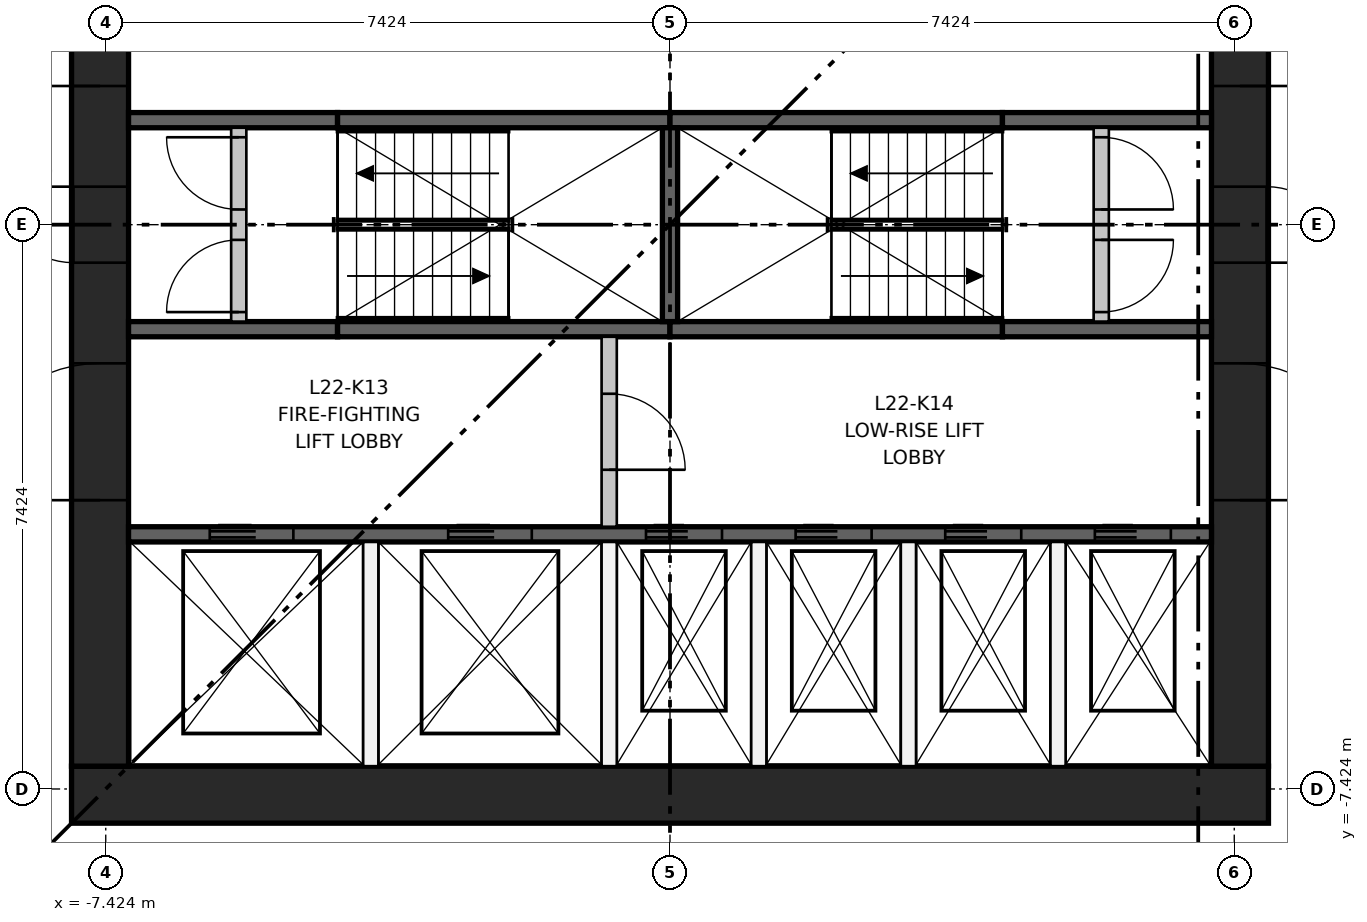
"""IFC4 building model, lengths in metres.
Left out: names, types, materials, properties, quantities, classifications, styles, units other than length and angle.
Written with IfcOpenShell. Run it as: python <this file> out.ifc"""

import sys

from ifc_helpers import new_model, si_unit, direction, frame, frame_2d, origin, place, context, subcontext, project, spatial, rectangle, extrude, element, fill, save


model = new_model("IFC4")
c1 = context("Model", 3, precision=1e-05, world=origin(), true_north=direction((0.0, 1.0)))
c2 = subcontext(c1, "Body", "Model", "MODEL_VIEW")
j1 = project(units=[si_unit("LENGTHUNIT", "METRE"), si_unit("PLANEANGLEUNIT", "RADIAN")], contexts=[c1])
p1 = place(None, origin())
s1 = spatial("IfcSite", under=j1, at=p1, CompositionType="ELEMENT")
p2 = place(p1, origin())
s2 = spatial("IfcBuilding", under=s1, at=p2, CompositionType="ELEMENT")
p3 = place(p2, frame((0.0, 0.0, 87.35)))
s3 = spatial("IfcBuildingStorey", under=s2, at=p3, CompositionType="ELEMENT", Elevation=87.35)
p4 = place(p3, frame((-7.874, -7.499, 0.0), z_axis=(0.0, 0.0, 1.0), x_axis=(1.0, 0.0, 0.0)))
e1 = element("IfcWall", 1, at=p4, inside=s3, PredefinedType="SHEAR", context=c2, shape_type="SweptSolid", body=[
    extrude(rectangle(XDim=15.748, YDim=0.75, at=frame_2d((7.874, 0.0))), origin(), (0.0, 0.0, 1.0), 3.65),
])
p5 = place(p3, frame((-7.499, -7.124, 0.0), z_axis=(0.0, 0.0, 1.0), x_axis=(0.0, 1.0, 0.0)))
e2 = element("IfcWall", 2, at=p5, inside=s3, PredefinedType="SHEAR", context=c2, shape_type="SweptSolid", body=[
    extrude(rectangle(XDim=14.248, YDim=0.75, at=frame_2d((7.124, 0.0))), origin(), (0.0, 0.0, 1.0), 3.65),
])
p6 = place(p5, frame((6.624, 0.0, 0.0)))
e3 = element("IfcOpeningElement", 3, at=p6, cuts=e2, PredefinedType="OPENING", context=c2, shape_type="SweptSolid", body=[
    extrude(rectangle(XDim=1.0, YDim=2.1, at=frame_2d((0.5, 1.05))), frame((0.0, 0.385, 0.0), z_axis=(0.0, -1.0, 0.0), x_axis=(1.0, 0.0, 0.0)), (0.0, 0.0, 1.0), 0.77),
])
p7 = place(p5, frame((3.5, 0.0, 0.0)))
e4 = element("IfcOpeningElement", 4, at=p7, cuts=e2, PredefinedType="OPENING", context=c2, shape_type="SweptSolid", body=[
    extrude(rectangle(XDim=1.8, YDim=2.1, at=frame_2d((0.9, 1.05))), frame((0.0, 0.385, 0.0), z_axis=(0.0, -1.0, 0.0), x_axis=(1.0, 0.0, 0.0)), (0.0, 0.0, 1.0), 0.77),
])
p8 = place(p5, frame((8.948, 0.0, 0.0)))
e5 = element("IfcOpeningElement", 5, at=p8, cuts=e2, PredefinedType="OPENING", context=c2, shape_type="SweptSolid", body=[
    extrude(rectangle(XDim=1.8, YDim=2.1, at=frame_2d((0.9, 1.05))), frame((0.0, 0.385, 0.0), z_axis=(0.0, -1.0, 0.0), x_axis=(1.0, 0.0, 0.0)), (0.0, 0.0, 1.0), 0.77),
])
p9 = place(p5, frame((12.124, 0.0, 0.0)))
e6 = element("IfcOpeningElement", 6, at=p9, cuts=e2, PredefinedType="OPENING", context=c2, shape_type="SweptSolid", body=[
    extrude(rectangle(XDim=1.0, YDim=2.1, at=frame_2d((0.5, 1.05))), frame((0.0, 0.385, 0.0), z_axis=(0.0, -1.0, 0.0), x_axis=(1.0, 0.0, 0.0)), (0.0, 0.0, 1.0), 0.77),
])
p10 = place(p3, frame((7.499, -7.124, 0.0), z_axis=(0.0, 0.0, 1.0), x_axis=(0.0, 1.0, 0.0)))
e7 = element("IfcWall", 7, at=p10, inside=s3, PredefinedType="SHEAR", context=c2, shape_type="SweptSolid", body=[
    extrude(rectangle(XDim=14.248, YDim=0.75, at=frame_2d((7.124, 0.0))), origin(), (0.0, 0.0, 1.0), 3.65),
])
p11 = place(p10, frame((6.624, 0.0, 0.0)))
e8 = element("IfcOpeningElement", 8, at=p11, cuts=e7, PredefinedType="OPENING", context=c2, shape_type="SweptSolid", body=[
    extrude(rectangle(XDim=1.0, YDim=2.1, at=frame_2d((0.5, 1.05))), frame((0.0, 0.385, 0.0), z_axis=(0.0, -1.0, 0.0), x_axis=(1.0, 0.0, 0.0)), (0.0, 0.0, 1.0), 0.77),
])
p12 = place(p10, frame((3.5, 0.0, 0.0)))
e9 = element("IfcOpeningElement", 9, at=p12, cuts=e7, PredefinedType="OPENING", context=c2, shape_type="SweptSolid", body=[
    extrude(rectangle(XDim=1.8, YDim=2.1, at=frame_2d((0.9, 1.05))), frame((0.0, 0.385, 0.0), z_axis=(0.0, -1.0, 0.0), x_axis=(1.0, 0.0, 0.0)), (0.0, 0.0, 1.0), 0.77),
])
p13 = place(p10, frame((8.948, 0.0, 0.0)))
e10 = element("IfcOpeningElement", 10, at=p13, cuts=e7, PredefinedType="OPENING", context=c2, shape_type="SweptSolid", body=[
    extrude(rectangle(XDim=1.8, YDim=2.1, at=frame_2d((0.9, 1.05))), frame((0.0, 0.385, 0.0), z_axis=(0.0, -1.0, 0.0), x_axis=(1.0, 0.0, 0.0)), (0.0, 0.0, 1.0), 0.77),
])
p14 = place(p3, frame((-7.124, -4.074, 0.0), z_axis=(0.0, 0.0, 1.0), x_axis=(1.0, 0.0, 0.0)))
e11 = element("IfcWall", 11, at=p14, inside=s3, PredefinedType="SHEAR", context=c2, shape_type="SweptSolid", body=[
    extrude(rectangle(XDim=14.248, YDim=0.2, at=frame_2d((7.124, 0.0))), origin(), (0.0, 0.0, 1.0), 3.3),
])
p15 = place(p14, frame((1.069, 0.0, 0.0)))
e12 = element("IfcOpeningElement", 12, at=p15, cuts=e11, PredefinedType="OPENING", context=c2, shape_type="SweptSolid", body=[
    extrude(rectangle(XDim=1.1, YDim=2.1, at=frame_2d((0.55, 1.05))), frame((0.0, 0.11, 0.0), z_axis=(0.0, -1.0, 0.0), x_axis=(1.0, 0.0, 0.0)), (0.0, 0.0, 1.0), 0.22),
])
p16 = place(p14, frame((4.206, 0.0, 0.0)))
e13 = element("IfcOpeningElement", 13, at=p16, cuts=e11, PredefinedType="OPENING", context=c2, shape_type="SweptSolid", body=[
    extrude(rectangle(XDim=1.1, YDim=2.1, at=frame_2d((0.55, 1.05))), frame((0.0, 0.11, 0.0), z_axis=(0.0, -1.0, 0.0), x_axis=(1.0, 0.0, 0.0)), (0.0, 0.0, 1.0), 0.22),
])
p17 = place(p14, frame((6.808, 0.0, 0.0)))
e14 = element("IfcOpeningElement", 14, at=p17, cuts=e11, PredefinedType="OPENING", context=c2, shape_type="SweptSolid", body=[
    extrude(rectangle(XDim=1.0, YDim=2.1, at=frame_2d((0.5, 1.05))), frame((0.0, 0.11, 0.0), z_axis=(0.0, -1.0, 0.0), x_axis=(1.0, 0.0, 0.0)), (0.0, 0.0, 1.0), 0.22),
])
p18 = place(p14, frame((8.777, 0.0, 0.0)))
e15 = element("IfcOpeningElement", 15, at=p18, cuts=e11, PredefinedType="OPENING", context=c2, shape_type="SweptSolid", body=[
    extrude(rectangle(XDim=1.0, YDim=2.1, at=frame_2d((0.5, 1.05))), frame((0.0, 0.11, 0.0), z_axis=(0.0, -1.0, 0.0), x_axis=(1.0, 0.0, 0.0)), (0.0, 0.0, 1.0), 0.22),
])
p19 = place(p14, frame((10.745, 0.0, 0.0)))
e16 = element("IfcOpeningElement", 16, at=p19, cuts=e11, PredefinedType="OPENING", context=c2, shape_type="SweptSolid", body=[
    extrude(rectangle(XDim=1.0, YDim=2.1, at=frame_2d((0.5, 1.05))), frame((0.0, 0.11, 0.0), z_axis=(0.0, -1.0, 0.0), x_axis=(1.0, 0.0, 0.0)), (0.0, 0.0, 1.0), 0.22),
])
p20 = place(p14, frame((12.714, 0.0, 0.0)))
e17 = element("IfcOpeningElement", 17, at=p20, cuts=e11, PredefinedType="OPENING", context=c2, shape_type="SweptSolid", body=[
    extrude(rectangle(XDim=1.0, YDim=2.1, at=frame_2d((0.5, 1.05))), frame((0.0, 0.11, 0.0), z_axis=(0.0, -1.0, 0.0), x_axis=(1.0, 0.0, 0.0)), (0.0, 0.0, 1.0), 0.22),
])
p21 = place(p3, frame((-7.124, -1.375, 0.0), z_axis=(0.0, 0.0, 1.0), x_axis=(1.0, 0.0, 0.0)))
e18 = element("IfcWall", 18, at=p21, inside=s3, PredefinedType="SHEAR", context=c2, shape_type="SweptSolid", body=[
    extrude(rectangle(XDim=2.75, YDim=0.2, at=frame_2d((1.375, 0.0))), origin(), (0.0, 0.0, 1.0), 3.3),
])
for number, where, z_axis, x_axis in (
    (19, (-4.374, -1.375, 0.0), (0.0, 0.0, 1.0), (1.0, 0.0, 0.0)),
    (20, (0.0, -1.375, 0.0), (0.0, 0.0, 1.0), (1.0, 0.0, 0.0)),
):
    element("IfcWall", number, at=place(p3, frame(where, z_axis=z_axis, x_axis=x_axis)), inside=s3, PredefinedType="SHEAR", context=c2, shape_type="SweptSolid", body=[
        extrude(rectangle(XDim=4.374, YDim=0.2, at=frame_2d((2.187, 0.0))), origin(), (0.0, 0.0, 1.0), 3.3),
    ])
for number, where, z_axis, x_axis in (
    (21, (4.374, -1.375, 0.0), (0.0, 0.0, 1.0), (1.0, 0.0, 0.0)),
    (22, (-7.124, 1.375, 0.0), (0.0, 0.0, 1.0), (1.0, 0.0, 0.0)),
):
    element("IfcWall", number, at=place(p3, frame(where, z_axis=z_axis, x_axis=x_axis)), inside=s3, PredefinedType="SHEAR", context=c2, shape_type="SweptSolid", body=[
        extrude(rectangle(XDim=2.75, YDim=0.2, at=frame_2d((1.375, 0.0))), origin(), (0.0, 0.0, 1.0), 3.3),
    ])
for number, where, z_axis, x_axis in (
    (23, (-4.374, 1.375, 0.0), (0.0, 0.0, 1.0), (1.0, 0.0, 0.0)),
    (24, (0.0, 1.375, 0.0), (0.0, 0.0, 1.0), (1.0, 0.0, 0.0)),
):
    element("IfcWall", number, at=place(p3, frame(where, z_axis=z_axis, x_axis=x_axis)), inside=s3, PredefinedType="SHEAR", context=c2, shape_type="SweptSolid", body=[
        extrude(rectangle(XDim=4.374, YDim=0.2, at=frame_2d((2.187, 0.0))), origin(), (0.0, 0.0, 1.0), 3.3),
    ])
p22 = place(p3, frame((4.374, 1.375, 0.0), z_axis=(0.0, 0.0, 1.0), x_axis=(1.0, 0.0, 0.0)))
e25 = element("IfcWall", 25, at=p22, inside=s3, PredefinedType="SHEAR", context=c2, shape_type="SweptSolid", body=[
    extrude(rectangle(XDim=2.75, YDim=0.2, at=frame_2d((1.375, 0.0))), origin(), (0.0, 0.0, 1.0), 3.3),
])
p23 = place(p3, frame((0.0, -1.275, 0.0), z_axis=(0.0, 0.0, 1.0), x_axis=(0.0, 1.0, 0.0)))
e26 = element("IfcWall", 26, at=p23, inside=s3, PredefinedType="SHEAR", context=c2, shape_type="SweptSolid", body=[
    extrude(rectangle(XDim=2.55, YDim=0.2, at=frame_2d((1.275, 0.0))), origin(), (0.0, 0.0, 1.0), 3.3),
])
for number, where, z_axis, x_axis in (
    (27, (-3.937, -7.124, 0.0), (0.0, 0.0, 1.0), (0.0, 1.0, 0.0)),
    (28, (-0.8, -7.124, 0.0), (0.0, 0.0, 1.0), (0.0, 1.0, 0.0)),
):
    element("IfcWall", number, at=place(p3, frame(where, z_axis=z_axis, x_axis=x_axis)), inside=s3, PredefinedType="PARTITIONING", context=c2, shape_type="SweptSolid", body=[
        extrude(rectangle(XDim=2.95, YDim=0.2, at=frame_2d((1.475, 0.0))), origin(), (0.0, 0.0, 1.0), 3.3),
    ])
p24 = place(p3, frame((-0.8, -3.974, 0.0), z_axis=(0.0, 0.0, 1.0), x_axis=(0.0, 1.0, 0.0)))
e29 = element("IfcWall", 29, at=p24, inside=s3, PredefinedType="PARTITIONING", context=c2, shape_type="SweptSolid", body=[
    extrude(rectangle(XDim=2.499, YDim=0.2, at=frame_2d((1.25, 0.0))), origin(), (0.0, 0.0, 1.0), 3.3),
])
p25 = place(p24, frame((0.75, 0.0, 0.0)))
e30 = element("IfcOpeningElement", 30, at=p25, cuts=e29, PredefinedType="OPENING", context=c2, shape_type="SweptSolid", body=[
    extrude(rectangle(XDim=1.0, YDim=2.1, at=frame_2d((0.5, 1.05))), frame((0.0, 0.11, 0.0), z_axis=(0.0, -1.0, 0.0), x_axis=(1.0, 0.0, 0.0)), (0.0, 0.0, 1.0), 0.22),
])
for number, where, z_axis, x_axis in (
    (31, (1.168, -7.124, 0.0), (0.0, 0.0, 1.0), (0.0, 1.0, 0.0)),
    (32, (3.137, -7.124, 0.0), (0.0, 0.0, 1.0), (0.0, 1.0, 0.0)),
    (33, (5.105, -7.124, 0.0), (0.0, 0.0, 1.0), (0.0, 1.0, 0.0)),
):
    element("IfcWall", number, at=place(p3, frame(where, z_axis=z_axis, x_axis=x_axis)), inside=s3, PredefinedType="PARTITIONING", context=c2, shape_type="SweptSolid", body=[
        extrude(rectangle(XDim=2.95, YDim=0.2, at=frame_2d((1.475, 0.0))), origin(), (0.0, 0.0, 1.0), 3.3),
    ])
p26 = place(p3, frame((-5.674, -1.275, 0.0), z_axis=(0.0, 0.0, 1.0), x_axis=(0.0, 1.0, 0.0)))
e34 = element("IfcWall", 34, at=p26, inside=s3, PredefinedType="PARTITIONING", context=c2, shape_type="SweptSolid", body=[
    extrude(rectangle(XDim=2.55, YDim=0.2, at=frame_2d((1.275, 0.0))), origin(), (0.0, 0.0, 1.0), 3.3),
])
p27 = place(p26, frame((0.125, 0.0, 0.0)))
e35 = element("IfcOpeningElement", 35, at=p27, cuts=e34, PredefinedType="OPENING", context=c2, shape_type="SweptSolid", body=[
    extrude(rectangle(XDim=0.95, YDim=2.1, at=frame_2d((0.475, 1.05))), frame((0.0, 0.11, 0.0), z_axis=(0.0, -1.0, 0.0), x_axis=(1.0, 0.0, 0.0)), (0.0, 0.0, 1.0), 0.22),
])
p28 = place(p26, frame((1.475, 0.0, 0.0)))
e36 = element("IfcOpeningElement", 36, at=p28, cuts=e34, PredefinedType="OPENING", context=c2, shape_type="SweptSolid", body=[
    extrude(rectangle(XDim=0.95, YDim=2.1, at=frame_2d((0.475, 1.05))), frame((0.0, 0.11, 0.0), z_axis=(0.0, -1.0, 0.0), x_axis=(1.0, 0.0, 0.0)), (0.0, 0.0, 1.0), 0.22),
])
p29 = place(p3, frame((5.674, -1.275, 0.0), z_axis=(0.0, 0.0, 1.0), x_axis=(0.0, 1.0, 0.0)))
e37 = element("IfcWall", 37, at=p29, inside=s3, PredefinedType="PARTITIONING", context=c2, shape_type="SweptSolid", body=[
    extrude(rectangle(XDim=2.55, YDim=0.2, at=frame_2d((1.275, 0.0))), origin(), (0.0, 0.0, 1.0), 3.3),
])
p30 = place(p29, frame((0.125, 0.0, 0.0)))
e38 = element("IfcOpeningElement", 38, at=p30, cuts=e37, PredefinedType="OPENING", context=c2, shape_type="SweptSolid", body=[
    extrude(rectangle(XDim=0.95, YDim=2.1, at=frame_2d((0.475, 1.05))), frame((0.0, 0.11, 0.0), z_axis=(0.0, -1.0, 0.0), x_axis=(1.0, 0.0, 0.0)), (0.0, 0.0, 1.0), 0.22),
])
p31 = place(p29, frame((1.475, 0.0, 0.0)))
e39 = element("IfcOpeningElement", 39, at=p31, cuts=e37, PredefinedType="OPENING", context=c2, shape_type="SweptSolid", body=[
    extrude(rectangle(XDim=0.95, YDim=2.1, at=frame_2d((0.475, 1.05))), frame((0.0, 0.11, 0.0), z_axis=(0.0, -1.0, 0.0), x_axis=(1.0, 0.0, 0.0)), (0.0, 0.0, 1.0), 0.22),
])
p32 = place(p15, origin())
e40 = element("IfcDoor", 40, at=p32, inside=s3, OperationType="DOUBLE_DOOR_SLIDING", PredefinedType="DOOR", context=c2, shape_type="SweptSolid", body=[
    extrude(rectangle(XDim=1.1, YDim=2.1, at=frame_2d((0.55, 1.05))), frame((0.0, 0.025, 0.0), z_axis=(0.0, -1.0, 0.0), x_axis=(1.0, 0.0, 0.0)), (0.0, 0.0, 1.0), 0.05),
])
fill(e12, e40)
p33 = place(p16, origin())
e41 = element("IfcDoor", 41, at=p33, inside=s3, OperationType="DOUBLE_DOOR_SLIDING", PredefinedType="DOOR", context=c2, shape_type="SweptSolid", body=[
    extrude(rectangle(XDim=1.1, YDim=2.1, at=frame_2d((0.55, 1.05))), frame((0.0, 0.025, 0.0), z_axis=(0.0, -1.0, 0.0), x_axis=(1.0, 0.0, 0.0)), (0.0, 0.0, 1.0), 0.05),
])
fill(e13, e41)
p34 = place(p17, origin())
e42 = element("IfcDoor", 42, at=p34, inside=s3, OperationType="DOUBLE_DOOR_SLIDING", PredefinedType="DOOR", context=c2, shape_type="SweptSolid", body=[
    extrude(rectangle(XDim=1.0, YDim=2.1, at=frame_2d((0.5, 1.05))), frame((0.0, 0.025, 0.0), z_axis=(0.0, -1.0, 0.0), x_axis=(1.0, 0.0, 0.0)), (0.0, 0.0, 1.0), 0.05),
])
fill(e14, e42)
p35 = place(p18, origin())
e43 = element("IfcDoor", 43, at=p35, inside=s3, OperationType="DOUBLE_DOOR_SLIDING", PredefinedType="DOOR", context=c2, shape_type="SweptSolid", body=[
    extrude(rectangle(XDim=1.0, YDim=2.1, at=frame_2d((0.5, 1.05))), frame((0.0, 0.025, 0.0), z_axis=(0.0, -1.0, 0.0), x_axis=(1.0, 0.0, 0.0)), (0.0, 0.0, 1.0), 0.05),
])
fill(e15, e43)
p36 = place(p19, origin())
e44 = element("IfcDoor", 44, at=p36, inside=s3, OperationType="DOUBLE_DOOR_SLIDING", PredefinedType="DOOR", context=c2, shape_type="SweptSolid", body=[
    extrude(rectangle(XDim=1.0, YDim=2.1, at=frame_2d((0.5, 1.05))), frame((0.0, 0.025, 0.0), z_axis=(0.0, -1.0, 0.0), x_axis=(1.0, 0.0, 0.0)), (0.0, 0.0, 1.0), 0.05),
])
fill(e16, e44)
p37 = place(p20, origin())
e45 = element("IfcDoor", 45, at=p37, inside=s3, OperationType="DOUBLE_DOOR_SLIDING", PredefinedType="DOOR", context=c2, shape_type="SweptSolid", body=[
    extrude(rectangle(XDim=1.0, YDim=2.1, at=frame_2d((0.5, 1.05))), frame((0.0, 0.025, 0.0), z_axis=(0.0, -1.0, 0.0), x_axis=(1.0, 0.0, 0.0)), (0.0, 0.0, 1.0), 0.05),
])
fill(e17, e45)
p38 = place(p27, origin())
e46 = element("IfcDoor", 46, at=p38, inside=s3, OperationType="SINGLE_SWING_LEFT", PredefinedType="DOOR", context=c2, shape_type="SweptSolid", body=[
    extrude(rectangle(XDim=0.95, YDim=2.1, at=frame_2d((0.475, 1.05))), frame((0.0, 0.025, 0.0), z_axis=(0.0, -1.0, 0.0), x_axis=(1.0, 0.0, 0.0)), (0.0, 0.0, 1.0), 0.05),
])
fill(e35, e46)
p39 = place(p28, origin())
e47 = element("IfcDoor", 47, at=p39, inside=s3, OperationType="SINGLE_SWING_RIGHT", PredefinedType="DOOR", context=c2, shape_type="SweptSolid", body=[
    extrude(rectangle(XDim=0.95, YDim=2.1, at=frame_2d((0.475, 1.05))), frame((0.0, 0.025, 0.0), z_axis=(0.0, -1.0, 0.0), x_axis=(1.0, 0.0, 0.0)), (0.0, 0.0, 1.0), 0.05),
])
fill(e36, e47)
p40 = place(p30, frame((0.95, 0.0, 0.0), z_axis=(0.0, 0.0, 1.0), x_axis=(-1.0, 0.0, 0.0)))
e48 = element("IfcDoor", 48, at=p40, inside=s3, OperationType="SINGLE_SWING_RIGHT", PredefinedType="DOOR", context=c2, shape_type="SweptSolid", body=[
    extrude(rectangle(XDim=0.95, YDim=2.1, at=frame_2d((0.475, 1.05))), frame((0.0, 0.025, 0.0), z_axis=(0.0, -1.0, 0.0), x_axis=(1.0, 0.0, 0.0)), (0.0, 0.0, 1.0), 0.05),
])
fill(e38, e48)
p41 = place(p31, frame((0.95, 0.0, 0.0), z_axis=(0.0, 0.0, 1.0), x_axis=(-1.0, 0.0, 0.0)))
e49 = element("IfcDoor", 49, at=p41, inside=s3, OperationType="SINGLE_SWING_LEFT", PredefinedType="DOOR", context=c2, shape_type="SweptSolid", body=[
    extrude(rectangle(XDim=0.95, YDim=2.1, at=frame_2d((0.475, 1.05))), frame((0.0, 0.025, 0.0), z_axis=(0.0, -1.0, 0.0), x_axis=(1.0, 0.0, 0.0)), (0.0, 0.0, 1.0), 0.05),
])
fill(e39, e49)
p42 = place(p25, frame((1.0, 0.0, 0.0), z_axis=(0.0, 0.0, 1.0), x_axis=(-1.0, 0.0, 0.0)))
e50 = element("IfcDoor", 50, at=p42, inside=s3, OperationType="SINGLE_SWING_LEFT", PredefinedType="DOOR", context=c2, shape_type="SweptSolid", body=[
    extrude(rectangle(XDim=1.0, YDim=2.1, at=frame_2d((0.5, 1.05))), frame((0.0, 0.025, 0.0), z_axis=(0.0, -1.0, 0.0), x_axis=(1.0, 0.0, 0.0)), (0.0, 0.0, 1.0), 0.05),
])
fill(e30, e50)
p43 = place(p6, origin())
e51 = element("IfcDoor", 51, at=p43, inside=s3, OperationType="SINGLE_SWING_RIGHT", PredefinedType="DOOR", context=c2, shape_type="SweptSolid", body=[
    extrude(rectangle(XDim=1.0, YDim=2.1, at=frame_2d((0.5, 1.05))), frame((0.0, 0.375, 0.0), z_axis=(0.0, -1.0, 0.0), x_axis=(1.0, 0.0, 0.0)), (0.0, 0.0, 1.0), 0.05),
])
fill(e3, e51)
p44 = place(p7, origin())
e52 = element("IfcDoor", 52, at=p44, inside=s3, OperationType="DOUBLE_DOOR_SINGLE_SWING", PredefinedType="DOOR", context=c2, shape_type="SweptSolid", body=[
    extrude(rectangle(XDim=1.8, YDim=2.1, at=frame_2d((0.9, 1.05))), frame((0.0, 0.025, 0.0), z_axis=(0.0, -1.0, 0.0), x_axis=(1.0, 0.0, 0.0)), (0.0, 0.0, 1.0), 0.05),
])
fill(e4, e52)
p45 = place(p8, origin())
e53 = element("IfcDoor", 53, at=p45, inside=s3, OperationType="DOUBLE_DOOR_SINGLE_SWING", PredefinedType="DOOR", context=c2, shape_type="SweptSolid", body=[
    extrude(rectangle(XDim=1.8, YDim=2.1, at=frame_2d((0.9, 1.05))), frame((0.0, 0.025, 0.0), z_axis=(0.0, -1.0, 0.0), x_axis=(1.0, 0.0, 0.0)), (0.0, 0.0, 1.0), 0.05),
])
fill(e5, e53)
p46 = place(p11, frame((1.0, 0.0, 0.0), z_axis=(0.0, 0.0, 1.0), x_axis=(-1.0, 0.0, 0.0)))
e54 = element("IfcDoor", 54, at=p46, inside=s3, OperationType="SINGLE_SWING_LEFT", PredefinedType="DOOR", context=c2, shape_type="SweptSolid", body=[
    extrude(rectangle(XDim=1.0, YDim=2.1, at=frame_2d((0.5, 1.05))), frame((0.0, 0.375, 0.0), z_axis=(0.0, -1.0, 0.0), x_axis=(1.0, 0.0, 0.0)), (0.0, 0.0, 1.0), 0.05),
])
fill(e8, e54)
p47 = place(p12, frame((1.8, 0.0, 0.0), z_axis=(0.0, 0.0, 1.0), x_axis=(-1.0, 0.0, 0.0)))
e55 = element("IfcDoor", 55, at=p47, inside=s3, OperationType="DOUBLE_DOOR_SINGLE_SWING", PredefinedType="DOOR", context=c2, shape_type="SweptSolid", body=[
    extrude(rectangle(XDim=1.8, YDim=2.1, at=frame_2d((0.9, 1.05))), frame((0.0, 0.025, 0.0), z_axis=(0.0, -1.0, 0.0), x_axis=(1.0, 0.0, 0.0)), (0.0, 0.0, 1.0), 0.05),
])
fill(e9, e55)
p48 = place(p13, frame((1.8, 0.0, 0.0), z_axis=(0.0, 0.0, 1.0), x_axis=(-1.0, 0.0, 0.0)))
e56 = element("IfcDoor", 56, at=p48, inside=s3, OperationType="DOUBLE_DOOR_SINGLE_SWING", PredefinedType="DOOR", context=c2, shape_type="SweptSolid", body=[
    extrude(rectangle(XDim=1.8, YDim=2.1, at=frame_2d((0.9, 1.05))), frame((0.0, 0.025, 0.0), z_axis=(0.0, -1.0, 0.0), x_axis=(1.0, 0.0, 0.0)), (0.0, 0.0, 1.0), 0.05),
])
fill(e10, e56)
save(model, sys.argv[1])
